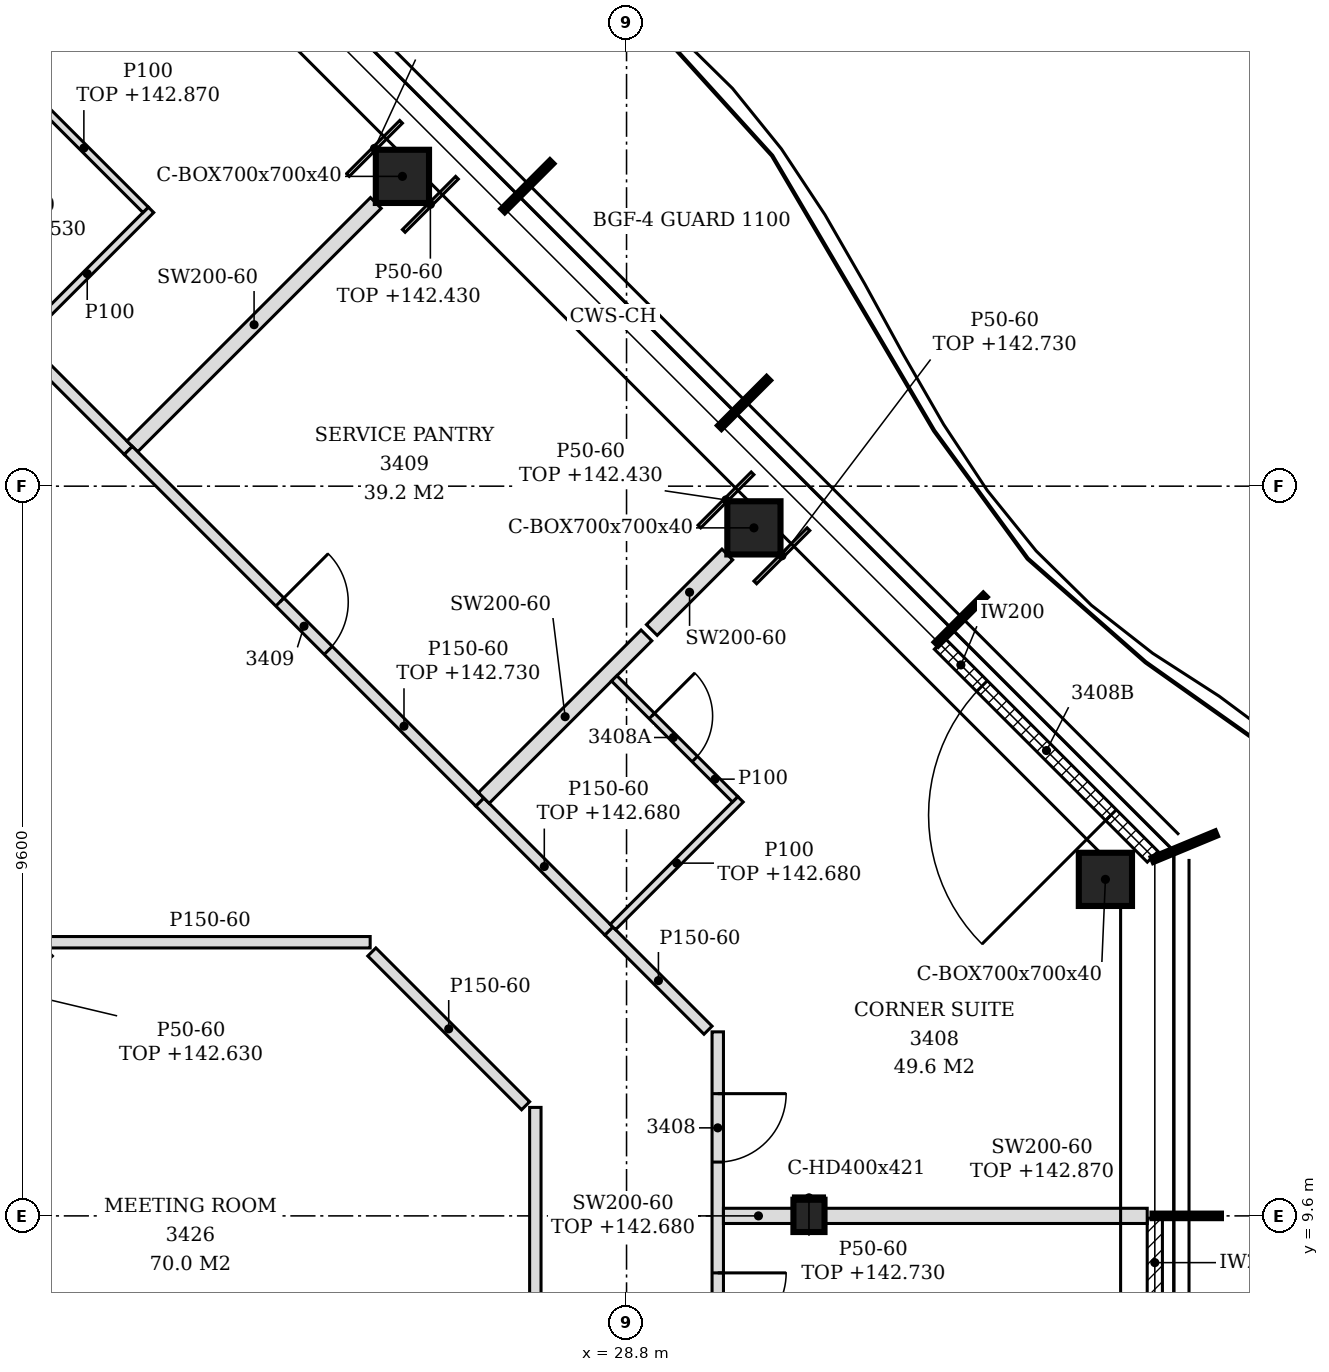
"""IFC4 building model, lengths in metres.
Left out: names, types, materials, properties, quantities, classifications, styles, units other than length and angle.
Written with IfcOpenShell. Run it as: python <this file> out.ifc"""

import sys

from ifc_helpers import new_model, si_unit, direction, frame, frame_2d, origin, origin_2d, place, context, subcontext, project, spatial, polyline, rectangle, hollow_rectangle, i_section, outline, extrude, element, fill, save


model = new_model("IFC4")
c1 = context("Model", 3, precision=1e-05, world=origin(), true_north=direction((0.0, 1.0)))
c2 = subcontext(c1, "Body", "Model", "MODEL_VIEW")
j1 = project(units=[si_unit("LENGTHUNIT", "METRE"), si_unit("PLANEANGLEUNIT", "RADIAN")], contexts=[c1])
p1 = place(None, origin())
s1 = spatial("IfcSite", under=j1, at=p1, CompositionType="ELEMENT")
p2 = place(p1, origin())
s2 = spatial("IfcBuilding", under=s1, at=p2, CompositionType="ELEMENT")
p3 = place(p2, frame((0.0, 0.0, 139.8)))
s3 = spatial("IfcBuildingStorey", under=s2, at=p3, CompositionType="ELEMENT", Elevation=139.8)
for number, where, z_axis, x_axis in (
    (1, (35.1, 14.027, -0.15), (0.0, 0.0, 1.0), (1.0, 0.0, 0.0)),
    (2, (30.476, 18.652, -0.15), (0.0, 0.0, 1.0), (1.0, 0.0, 0.0)),
    (3, (25.852, 23.276, -0.15), (0.0, 0.0, 1.0), (1.0, 0.0, 0.0)),
):
    element("IfcColumn", number, at=place(p3, frame(where, z_axis=z_axis, x_axis=x_axis)), inside=s3, PredefinedType="COLUMN", context=c2, shape_type="SweptSolid", body=[
        extrude(hollow_rectangle(XDim=0.7, YDim=0.7, WallThickness=0.04, at=origin_2d()), origin(), (0.0, 0.0, 1.0), 3.6),
    ])
p4 = place(p3, frame((31.2, 9.6, -0.15), z_axis=(0.0, 0.0, 1.0), x_axis=(1.0, 0.0, 0.0)))
e4 = element("IfcColumn", 4, at=p4, inside=s3, PredefinedType="COLUMN", context=c2, shape_type="SweptSolid", body=[
    extrude(i_section(OverallWidth=0.409, OverallDepth=0.425, WebThickness=0.033, FlangeThickness=0.052, FilletRadius=0.015, at=origin_2d()), origin(), (0.0, 0.0, 1.0), 3.6),
])
p5 = place(p3, frame((35.75, 4.83, 0.0), z_axis=(0.0, 0.0, 1.0), x_axis=(0.0, 1.0, 0.0)))
e5 = element("IfcWall", 5, at=p5, inside=s3, PredefinedType="NOTDEFINED", context=c2, shape_type="SweptSolid", body=[
    extrude(rectangle(XDim=4.74, YDim=0.2, at=frame_2d((2.37, 0.0))), origin(), (0.0, 0.0, 1.0), 3.45),
])
p6 = place(p5, frame((1.17, 0.0, 0.0)))
e6 = element("IfcOpeningElement", 6, at=p6, cuts=e5, PredefinedType="OPENING", context=c2, shape_type="SweptSolid", body=[
    extrude(rectangle(XDim=2.4, YDim=2.4, at=frame_2d((1.2, 1.2))), frame((0.0, 0.11, 0.0), z_axis=(0.0, -1.0, 0.0), x_axis=(1.0, 0.0, 0.0)), (0.0, 0.0, 1.0), 0.22),
])
p7 = place(p3, frame((35.722, 14.325, 0.0), z_axis=(0.0, 0.0, 1.0), x_axis=(-0.707106781187, 0.707106781187, 0.0)))
e7 = element("IfcWall", 7, at=p7, inside=s3, PredefinedType="NOTDEFINED", context=c2, shape_type="SweptSolid", body=[
    extrude(rectangle(XDim=3.962, YDim=0.2, at=frame_2d((1.981, 0.0))), origin(), (0.0, 0.0, 1.0), 3.45),
])
p8 = place(p7, frame((0.775, 0.0, 0.0)))
e8 = element("IfcOpeningElement", 8, at=p8, cuts=e7, PredefinedType="OPENING", context=c2, shape_type="SweptSolid", body=[
    extrude(rectangle(XDim=2.4, YDim=2.4, at=frame_2d((1.2, 1.2))), frame((0.0, 0.11, 0.0), z_axis=(0.0, -1.0, 0.0), x_axis=(1.0, 0.0, 0.0)), (0.0, 0.0, 1.0), 0.22),
])
p9 = place(p3, frame((30.0, -0.813, 0.0), z_axis=(0.0, 0.0, 1.0), x_axis=(0.0, 1.0, 0.0)))
e9 = element("IfcWall", 9, at=p9, inside=s3, PredefinedType="PARTITIONING", context=c2, shape_type="SweptSolid", body=[
    extrude(outline(polyline([(0.0, 0.0), (12.834, 0.0), (12.834, 3.45), (10.518, 3.45), (10.516, 2.88), (10.308, 2.88), (10.306, 3.45), (5.718, 3.45), (5.716, 2.88), (5.508, 2.88), (5.506, 3.45), (0.918, 3.45), (0.916, 2.88), (0.708, 2.88), (0.706, 3.45), (0.0, 3.45), (0.0, 0.0)])), frame((0.0, 0.075, 0.0), z_axis=(0.0, -1.0, 0.0), x_axis=(1.0, 0.0, 0.0)), (0.0, 0.0, 1.0), 0.15),
])
p10 = place(p9, frame((1.563, 0.0, 0.0)))
e10 = element("IfcOpeningElement", 10, at=p10, cuts=e9, PredefinedType="OPENING", context=c2, shape_type="SweptSolid", body=[
    extrude(rectangle(XDim=0.9, YDim=2.1, at=frame_2d((0.45, 1.05))), frame((0.0, 0.085, 0.0), z_axis=(0.0, -1.0, 0.0), x_axis=(1.0, 0.0, 0.0)), (0.0, 0.0, 1.0), 0.17),
])
p11 = place(p9, frame((8.763, 0.0, 0.0)))
e11 = element("IfcOpeningElement", 11, at=p11, cuts=e9, PredefinedType="OPENING", context=c2, shape_type="SweptSolid", body=[
    extrude(rectangle(XDim=0.9, YDim=2.1, at=frame_2d((0.45, 1.05))), frame((0.0, 0.085, 0.0), z_axis=(0.0, -1.0, 0.0), x_axis=(1.0, 0.0, 0.0)), (0.0, 0.0, 1.0), 0.17),
])
p12 = place(p9, frame((11.121, 0.0, 0.0)))
e12 = element("IfcOpeningElement", 12, at=p12, cuts=e9, PredefinedType="OPENING", context=c2, shape_type="SweptSolid", body=[
    extrude(rectangle(XDim=0.9, YDim=2.1, at=frame_2d((0.45, 1.05))), frame((0.0, 0.085, 0.0), z_axis=(0.0, -1.0, 0.0), x_axis=(1.0, 0.0, 0.0)), (0.0, 0.0, 1.0), 0.17),
])
p13 = place(p3, frame((27.6, 3.675, 0.0), z_axis=(0.0, 0.0, 1.0), x_axis=(0.0, 1.0, 0.0)))
e13 = element("IfcWall", 13, at=p13, inside=s3, PredefinedType="PARTITIONING", context=c2, shape_type="SweptSolid", body=[
    extrude(outline(polyline([(0.0, 0.0), (7.352, 0.0), (7.352, 3.45), (6.03, 3.45), (6.028, 2.88), (5.82, 2.88), (5.818, 3.45), (1.23, 3.45), (1.228, 2.88), (1.02, 2.88), (1.018, 3.45), (0.0, 3.45), (0.0, 0.0)])), frame((0.0, 0.075, 0.0), z_axis=(0.0, -1.0, 0.0), x_axis=(1.0, 0.0, 0.0)), (0.0, 0.0, 1.0), 0.15),
])
p14 = place(p3, frame((30.075, 9.6, 0.0), z_axis=(0.0, 0.0, 1.0), x_axis=(1.0, 0.0, 0.0)))
e14 = element("IfcWall", 14, at=p14, inside=s3, PredefinedType="PARTITIONING", context=c2, shape_type="SweptSolid", body=[
    extrude(rectangle(XDim=0.921, YDim=0.2, at=frame_2d((0.46, 0.0))), origin(), (0.0, 0.0, 1.0), 2.88),
])
p15 = place(p3, frame((31.405, 9.6, 0.0), z_axis=(0.0, 0.0, 1.0), x_axis=(1.0, 0.0, 0.0)))
e15 = element("IfcWall", 15, at=p15, inside=s3, PredefinedType="PARTITIONING", context=c2, shape_type="SweptSolid", body=[
    extrude(outline(polyline([(0.0, 0.0), (4.245, 0.0), (4.246, 3.07), (3.845, 3.07), (3.844, 2.93), (3.545, 2.93), (3.543, 3.07), (0.0, 3.07), (0.0, 0.0)])), frame((0.0, 0.1, 0.0), z_axis=(0.0, -1.0, 0.0), x_axis=(1.0, 0.0, 0.0)), (0.0, 0.0, 1.0), 0.2),
])
p16 = place(p3, frame((27.472, 11.049, 0.0), z_axis=(0.0, 0.0, 1.0), x_axis=(-0.707106781187, 0.707106781187, 0.0)))
e16 = element("IfcWall", 16, at=p16, inside=s3, PredefinedType="PARTITIONING", context=c2, shape_type="SweptSolid", body=[
    extrude(rectangle(XDim=2.861, YDim=0.15, at=frame_2d((1.43, 0.0))), origin(), (0.0, 0.0, 1.0), 3.45),
])
p17 = place(p3, frame((29.872, 12.043, 0.0), z_axis=(0.0, 0.0, 1.0), x_axis=(-0.707172918471, 0.707040637716, 0.0)))
e17 = element("IfcWall", 17, at=p17, inside=s3, PredefinedType="PARTITIONING", context=c2, shape_type="SweptSolid", body=[
    extrude(rectangle(XDim=1.846, YDim=0.15, at=frame_2d((0.923, 0.0))), origin(), (0.0, 0.0, 1.0), 3.45),
])
p18 = place(p3, frame((20.208, 12.086, 0.0), z_axis=(0.0, 0.0, 1.0), x_axis=(0.706756381459, 0.707457007363, 0.0)))
e18 = element("IfcWall", 18, at=p18, inside=s3, PredefinedType="PARTITIONING", context=c2, shape_type="SweptSolid", body=[
    extrude(rectangle(XDim=1.394, YDim=0.15, at=frame_2d((0.697, 0.0))), origin(), (0.0, 0.0, 1.0), 3.45),
])
p19 = place(p3, frame((21.215, 13.2, 0.0), z_axis=(0.0, 0.0, 1.0), x_axis=(1.0, 0.0, 0.0)))
e19 = element("IfcWall", 19, at=p19, inside=s3, PredefinedType="PARTITIONING", context=c2, shape_type="SweptSolid", body=[
    extrude(rectangle(XDim=4.212, YDim=0.15, at=frame_2d((2.106, 0.0))), origin(), (0.0, 0.0, 1.0), 3.45),
])
p20 = place(p3, frame((28.567, 13.348, 0.0), z_axis=(0.0, 0.0, 1.0), x_axis=(-0.707310148094, 0.706903355773, 0.0)))
e20 = element("IfcWall", 20, at=p20, inside=s3, PredefinedType="PARTITIONING", context=c2, shape_type="SweptSolid", body=[
    extrude(rectangle(XDim=2.401, YDim=0.15, at=frame_2d((1.2, 0.0))), origin(), (0.0, 0.0, 1.0), 2.88),
])
p21 = place(p3, frame((28.62, 13.401, 0.0), z_axis=(0.0, 0.0, 1.0), x_axis=(0.707055379538, 0.707158179099, 0.0)))
e21 = element("IfcWall", 21, at=p21, inside=s3, PredefinedType="PARTITIONING", context=c2, shape_type="SweptSolid", body=[
    extrude(rectangle(XDim=2.375, YDim=0.1, at=frame_2d((1.188, 0.0))), origin(), (0.0, 0.0, 1.0), 2.88),
])
p22 = place(p3, frame((26.869, 15.045, 0.0), z_axis=(0.0, 0.0, 1.0), x_axis=(-0.707013447311, 0.707200102744, 0.0)))
e22 = element("IfcWall", 22, at=p22, inside=s3, PredefinedType="PARTITIONING", context=c2, shape_type="SweptSolid", body=[
    extrude(rectangle(XDim=6.54, YDim=0.15, at=frame_2d((3.27, 0.0))), origin(), (0.0, 0.0, 1.0), 2.93),
])
p23 = place(p22, frame((2.82, 0.0, 0.0)))
e23 = element("IfcOpeningElement", 23, at=p23, cuts=e22, PredefinedType="OPENING", context=c2, shape_type="SweptSolid", body=[
    extrude(rectangle(XDim=0.9, YDim=2.1, at=frame_2d((0.45, 1.05))), frame((0.0, 0.085, 0.0), z_axis=(0.0, -1.0, 0.0), x_axis=(1.0, 0.0, 0.0)), (0.0, 0.0, 1.0), 0.17),
])
p24 = place(p3, frame((26.922, 15.098, 0.0), z_axis=(0.0, 0.0, 1.0), x_axis=(0.707268147401, 0.706945378138, 0.0)))
e24 = element("IfcWall", 24, at=p24, inside=s3, PredefinedType="PARTITIONING", context=c2, shape_type="SweptSolid", body=[
    extrude(rectangle(XDim=3.026, YDim=0.2, at=frame_2d((1.513, 0.0))), origin(), (0.0, 0.0, 1.0), 3.45),
])
p25 = place(p3, frame((30.229, 15.08, 0.0), z_axis=(0.0, 0.0, 1.0), x_axis=(-0.707052524, 0.70716103421, 0.0)))
e25 = element("IfcWall", 25, at=p25, inside=s3, PredefinedType="PARTITIONING", context=c2, shape_type="SweptSolid", body=[
    extrude(rectangle(XDim=2.25, YDim=0.1, at=frame_2d((1.125, 0.0))), origin(), (0.0, 0.0, 1.0), 3.45),
])
p26 = place(p25, frame((0.75, 0.0, 0.0)))
e26 = element("IfcOpeningElement", 26, at=p26, cuts=e25, PredefinedType="OPENING", context=c2, shape_type="SweptSolid", body=[
    extrude(rectangle(XDim=0.8, YDim=2.1, at=frame_2d((0.4, 1.05))), frame((0.0, 0.06, 0.0), z_axis=(0.0, -1.0, 0.0), x_axis=(1.0, 0.0, 0.0)), (0.0, 0.0, 1.0), 0.12),
])
p27 = place(p3, frame((29.133, 17.308, 0.0), z_axis=(0.0, 0.0, 1.0), x_axis=(0.70693298083, 0.707280538835, 0.0)))
e27 = element("IfcWall", 27, at=p27, inside=s3, PredefinedType="PARTITIONING", context=c2, shape_type="SweptSolid", body=[
    extrude(rectangle(XDim=1.405, YDim=0.2, at=frame_2d((0.702, 0.0))), origin(), (0.0, 0.0, 1.0), 3.45),
])
p28 = place(p3, frame((22.245, 19.67, 0.0), z_axis=(0.0, 0.0, 1.0), x_axis=(-0.707106781187, 0.707106781187, 0.0)))
e28 = element("IfcWall", 28, at=p28, inside=s3, PredefinedType="PARTITIONING", context=c2, shape_type="SweptSolid", body=[
    extrude(rectangle(XDim=4.246, YDim=0.15, at=frame_2d((2.123, 0.0))), origin(), (0.0, 0.0, 1.0), 2.73),
])
p29 = place(p3, frame((22.298, 19.723, 0.0), z_axis=(0.0, 0.0, 1.0), x_axis=(0.707160674466, 0.707052883799, 0.0)))
e29 = element("IfcWall", 29, at=p29, inside=s3, PredefinedType="PARTITIONING", context=c2, shape_type="SweptSolid", body=[
    extrude(rectangle(XDim=4.53, YDim=0.2, at=frame_2d((2.265, 0.0))), origin(), (0.0, 0.0, 1.0), 3.45),
])
p30 = place(p3, frame((20.865, 21.156, 0.0), z_axis=(0.0, 0.0, 1.0), x_axis=(0.707106781187, 0.707106781187, 0.0)))
e30 = element("IfcWall", 30, at=p30, inside=s3, PredefinedType="PARTITIONING", context=c2, shape_type="SweptSolid", body=[
    extrude(rectangle(XDim=2.375, YDim=0.1, at=frame_2d((1.188, 0.0))), origin(), (0.0, 0.0, 1.0), 3.45),
])
p31 = place(p3, frame((22.474, 22.835, 0.0), z_axis=(0.0, 0.0, 1.0), x_axis=(-0.707106781187, 0.707106781187, 0.0)))
e31 = element("IfcWall", 31, at=p31, inside=s3, PredefinedType="PARTITIONING", context=c2, shape_type="SweptSolid", body=[
    extrude(rectangle(XDim=2.3, YDim=0.1, at=frame_2d((1.15, 0.0))), origin(), (0.0, 0.0, 1.0), 3.07),
])
p32 = place(p3, frame((30.996, 9.837, 0.0), z_axis=(0.0, 0.0, 1.0), x_axis=(1.0, 0.0, 0.0)))
e32 = element("IfcWall", 32, at=p32, inside=s3, PredefinedType="PARTITIONING", context=c2, shape_type="SweptSolid", body=[
    extrude(rectangle(XDim=0.409, YDim=0.05, at=frame_2d((0.205, 0.0))), origin(), (0.0, 0.0, 1.0), 2.93),
])
p33 = place(p3, frame((29.758, 18.669, 0.0), z_axis=(0.0, 0.0, 1.0), x_axis=(0.706983473703, 0.707230067171, 0.0)))
e33 = element("IfcWall", 33, at=p33, inside=s3, PredefinedType="PARTITIONING", context=c2, shape_type="SweptSolid", body=[
    extrude(rectangle(XDim=0.99, YDim=0.05, at=frame_2d((0.495, 0.0))), origin(), (0.0, 0.0, 1.0), 2.63),
])
for number, where, z_axis, x_axis in (
    (34, (30.493, 17.934, 0.0), (0.0, 0.0, 1.0), (0.707, 0.707, 0.0)),
    (35, (25.134, 23.293, 0.0), (0.0, 0.0, 1.0), (0.707, 0.707, 0.0)),
):
    element("IfcWall", number, at=place(p3, frame(where, z_axis=z_axis, x_axis=x_axis)), inside=s3, PredefinedType="PARTITIONING", context=c2, shape_type="SweptSolid", body=[
        extrude(rectangle(XDim=0.99, YDim=0.05, at=frame_2d((0.495, 0.0))), origin(), (0.0, 0.0, 1.0), 2.93),
    ])
p34 = place(p3, frame((25.869, 22.558, 0.0), z_axis=(0.0, 0.0, 1.0), x_axis=(0.707230110177, 0.706983430682, 0.0)))
e36 = element("IfcWall", 36, at=p34, inside=s3, PredefinedType="PARTITIONING", context=c2, shape_type="SweptSolid", body=[
    extrude(rectangle(XDim=0.99, YDim=0.05, at=frame_2d((0.495, 0.0))), origin(), (0.0, 0.0, 1.0), 2.63),
])
p35 = place(p8, origin())
e37 = element("IfcDoor", 37, at=p35, inside=s3, OperationType="SINGLE_SWING_LEFT", PredefinedType="DOOR", context=c2, shape_type="SweptSolid", body=[
    extrude(rectangle(XDim=2.4, YDim=2.4, at=frame_2d((1.2, 1.2))), frame((0.0, 0.025, 0.0), z_axis=(0.0, -1.0, 0.0), x_axis=(1.0, 0.0, 0.0)), (0.0, 0.0, 1.0), 0.05),
])
fill(e8, e37)
p36 = place(p11, frame((0.9, 0.0, 0.0), z_axis=(0.0, 0.0, 1.0), x_axis=(-1.0, 0.0, 0.0)))
e38 = element("IfcDoor", 38, at=p36, inside=s3, OperationType="SINGLE_SWING_LEFT", PredefinedType="DOOR", context=c2, shape_type="SweptSolid", body=[
    extrude(rectangle(XDim=0.9, YDim=2.1, at=frame_2d((0.45, 1.05))), frame((0.0, 0.025, 0.0), z_axis=(0.0, -1.0, 0.0), x_axis=(1.0, 0.0, 0.0)), (0.0, 0.0, 1.0), 0.05),
])
fill(e11, e38)
p37 = place(p12, frame((0.9, 0.0, 0.0), z_axis=(0.0, 0.0, 1.0), x_axis=(-1.0, 0.0, 0.0)))
e39 = element("IfcDoor", 39, at=p37, inside=s3, OperationType="SINGLE_SWING_LEFT", PredefinedType="DOOR", context=c2, shape_type="SweptSolid", body=[
    extrude(rectangle(XDim=0.9, YDim=2.1, at=frame_2d((0.45, 1.05))), frame((0.0, 0.025, 0.0), z_axis=(0.0, -1.0, 0.0), x_axis=(1.0, 0.0, 0.0)), (0.0, 0.0, 1.0), 0.05),
])
fill(e12, e39)
p38 = place(p26, frame((0.8, 0.0, 0.0), z_axis=(0.0, 0.0, 1.0), x_axis=(-1.0, 0.0, 0.0)))
e40 = element("IfcDoor", 40, at=p38, inside=s3, OperationType="SINGLE_SWING_LEFT", PredefinedType="DOOR", context=c2, shape_type="SweptSolid", body=[
    extrude(rectangle(XDim=0.8, YDim=2.1, at=frame_2d((0.4, 1.05))), frame((0.0, 0.025, 0.0), z_axis=(0.0, -1.0, 0.0), x_axis=(1.0, 0.0, 0.0)), (0.0, 0.0, 1.0), 0.05),
])
fill(e26, e40)
p39 = place(p23, frame((0.9, 0.0, 0.0), z_axis=(0.0, 0.0, 1.0), x_axis=(-1.0, 0.0, 0.0)))
e41 = element("IfcDoor", 41, at=p39, inside=s3, OperationType="SINGLE_SWING_LEFT", PredefinedType="DOOR", context=c2, shape_type="SweptSolid", body=[
    extrude(rectangle(XDim=0.9, YDim=2.1, at=frame_2d((0.45, 1.05))), frame((0.0, 0.025, 0.0), z_axis=(0.0, -1.0, 0.0), x_axis=(1.0, 0.0, 0.0)), (0.0, 0.0, 1.0), 0.05),
])
fill(e23, e41)
save(model, sys.argv[1])
